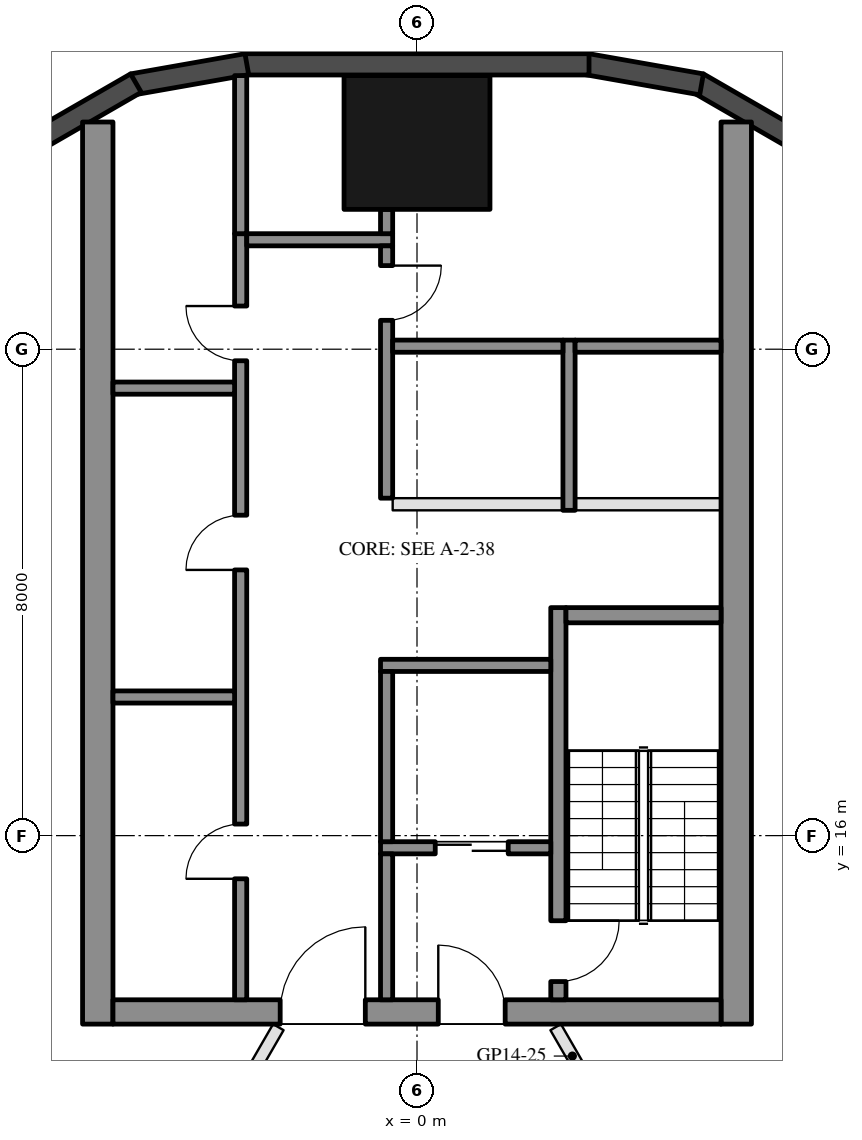
"""IFC4 building model, lengths in metres.
Left out: names, types, materials, properties, quantities, classifications, styles, units other than length and angle.
Written with IfcOpenShell. Run it as: python <this file> out.ifc"""

import sys

from ifc_helpers import new_model, si_unit, direction, frame, frame_2d, origin, origin_2d, place, context, subcontext, project, spatial, rectangle, hollow_rectangle, extrude, element, fill, save


model = new_model("IFC4")
c1 = context("Model", 3, precision=1e-05, world=origin(), true_north=direction((0.0, 1.0)))
c2 = subcontext(c1, "Body", "Model", "MODEL_VIEW")
j1 = project(units=[si_unit("LENGTHUNIT", "METRE"), si_unit("PLANEANGLEUNIT", "RADIAN")], contexts=[c1])
p1 = place(None, origin())
s1 = spatial("IfcSite", under=j1, at=p1, CompositionType="ELEMENT")
p2 = place(p1, origin())
s2 = spatial("IfcBuilding", under=s1, at=p2, CompositionType="ELEMENT")
p3 = place(p2, frame((0.0, 0.0, 165.1)))
s3 = spatial("IfcBuildingStorey", under=s2, at=p3, CompositionType="ELEMENT", Elevation=165.1)
p4 = place(p3, frame((0.0, 27.4, 0.0), z_axis=(0.0, 0.0, 1.0), x_axis=(1.0, 0.0, 0.0)))
e1 = element("IfcColumn", 1, at=p4, inside=s3, PredefinedType="COLUMN", context=c2, shape_type="SweptSolid", body=[
    extrude(hollow_rectangle(XDim=2.4, YDim=2.2, WallThickness=0.06, at=origin_2d()), origin(), (0.0, 0.0, 1.0), 3.7),
])
for number, where, z_axis, x_axis in (
    (2, (6.277, 27.422, 0.0), (0.0, 0.0, 1.0), (-0.866, 0.5, 0.0)),
    (3, (4.68, 28.356, 0.0), (0.0, 0.0, 1.0), (-0.985, 0.174, 0.0)),
):
    element("IfcWall", number, at=place(p3, frame(where, z_axis=z_axis, x_axis=x_axis)), inside=s3, PredefinedType="SOLIDWALL", context=c2, shape_type="SweptSolid", body=[
        extrude(rectangle(XDim=1.91, YDim=0.35, at=frame_2d((0.955, 0.0))), origin(), (0.0, 0.0, 1.0), 3.55),
    ])
p5 = place(p3, frame((2.829, 28.685, 0.0), z_axis=(0.0, 0.0, 1.0), x_axis=(-1.0, 0.0, 0.0)))
e4 = element("IfcWall", 4, at=p5, inside=s3, PredefinedType="SOLIDWALL", context=c2, shape_type="SweptSolid", body=[
    extrude(rectangle(XDim=5.658, YDim=0.35, at=frame_2d((2.829, 0.0))), origin(), (0.0, 0.0, 1.0), 3.55),
])
for number, where, z_axis, x_axis in (
    (5, (-2.799, 28.688, 0.0), (0.0, 0.0, 1.0), (-0.985, -0.174, 0.0)),
    (6, (-4.623, 28.377, 0.0), (0.0, 0.0, 1.0), (-0.866, -0.5, 0.0)),
):
    element("IfcWall", number, at=place(p3, frame(where, z_axis=z_axis, x_axis=x_axis)), inside=s3, PredefinedType="SOLIDWALL", context=c2, shape_type="SweptSolid", body=[
        extrude(rectangle(XDim=1.91, YDim=0.35, at=frame_2d((0.955, 0.0))), origin(), (0.0, 0.0, 1.0), 3.55),
    ])
for number, where, z_axis, x_axis in (
    (7, (5.25, 12.9, 0.0), (0.0, 0.0, 1.0), (0.0, 1.0, 0.0)),
    (8, (-5.25, 12.9, 0.0), (0.0, 0.0, 1.0), (0.0, 1.0, 0.0)),
):
    element("IfcWall", number, at=place(p3, frame(where, z_axis=z_axis, x_axis=x_axis)), inside=s3, PredefinedType="SHEAR", context=c2, shape_type="SweptSolid", body=[
        extrude(rectangle(XDim=14.837, YDim=0.5, at=frame_2d((7.418, 0.0))), origin(), (0.0, 0.0, 1.0), 3.5),
    ])
p6 = place(p3, frame((5.0, 13.1, 0.0), z_axis=(0.0, 0.0, 1.0), x_axis=(-1.0, 0.0, 0.0)))
e9 = element("IfcWall", 9, at=p6, inside=s3, PredefinedType="SHEAR", context=c2, shape_type="SweptSolid", body=[
    extrude(rectangle(XDim=10.0, YDim=0.4, at=frame_2d((5.0, 0.0))), origin(), (0.0, 0.0, 1.0), 3.5),
])
p7 = place(p6, frame((3.55, 0.0, 0.0)))
e10 = element("IfcOpeningElement", 10, at=p7, cuts=e9, PredefinedType="OPENING", context=c2, shape_type="SweptSolid", body=[
    extrude(rectangle(XDim=1.1, YDim=2.1, at=frame_2d((0.55, 1.05))), frame((0.0, 0.21, 0.0), z_axis=(0.0, -1.0, 0.0), x_axis=(1.0, 0.0, 0.0)), (0.0, 0.0, 1.0), 0.42),
])
p8 = place(p6, frame((5.85, 0.0, 0.0)))
e11 = element("IfcOpeningElement", 11, at=p8, cuts=e9, PredefinedType="OPENING", context=c2, shape_type="SweptSolid", body=[
    extrude(rectangle(XDim=1.4, YDim=2.1, at=frame_2d((0.7, 1.05))), frame((0.0, 0.21, 0.0), z_axis=(0.0, -1.0, 0.0), x_axis=(1.0, 0.0, 0.0)), (0.0, 0.0, 1.0), 0.42),
])
p9 = place(p3, frame((2.325, 13.3, 0.0), z_axis=(0.0, 0.0, 1.0), x_axis=(0.0, 1.0, 0.0)))
e12 = element("IfcWall", 12, at=p9, inside=s3, PredefinedType="SHEAR", context=c2, shape_type="SweptSolid", body=[
    extrude(rectangle(XDim=6.45, YDim=0.25, at=frame_2d((3.225, 0.0))), origin(), (0.0, 0.0, 1.0), 3.5),
])
p10 = place(p9, frame((0.3, 0.0, 0.0)))
e13 = element("IfcOpeningElement", 13, at=p10, cuts=e12, PredefinedType="OPENING", context=c2, shape_type="SweptSolid", body=[
    extrude(rectangle(XDim=1.0, YDim=2.1, at=frame_2d((0.5, 1.05))), frame((0.0, 0.135, 0.0), z_axis=(0.0, -1.0, 0.0), x_axis=(1.0, 0.0, 0.0)), (0.0, 0.0, 1.0), 0.27),
])
p11 = place(p3, frame((5.0, 19.625, 0.0), z_axis=(0.0, 0.0, 1.0), x_axis=(-1.0, 0.0, 0.0)))
e14 = element("IfcWall", 14, at=p11, inside=s3, PredefinedType="SHEAR", context=c2, shape_type="SweptSolid", body=[
    extrude(rectangle(XDim=2.55, YDim=0.25, at=frame_2d((1.275, 0.0))), origin(), (0.0, 0.0, 1.0), 3.5),
])
p12 = place(p3, frame((2.2, 18.8, 0.0), z_axis=(0.0, 0.0, 1.0), x_axis=(-1.0, 0.0, 0.0)))
e15 = element("IfcWall", 15, at=p12, inside=s3, PredefinedType="SHEAR", context=c2, shape_type="SweptSolid", body=[
    extrude(rectangle(XDim=2.8, YDim=0.2, at=frame_2d((1.4, 0.0))), origin(), (0.0, 0.0, 1.0), 3.5),
])
p13 = place(p3, frame((2.2, 15.8, 0.0), z_axis=(0.0, 0.0, 1.0), x_axis=(-1.0, 0.0, 0.0)))
e16 = element("IfcWall", 16, at=p13, inside=s3, PredefinedType="SHEAR", context=c2, shape_type="SweptSolid", body=[
    extrude(rectangle(XDim=2.8, YDim=0.2, at=frame_2d((1.4, 0.0))), origin(), (0.0, 0.0, 1.0), 3.5),
])
p14 = place(p13, frame((0.7, 0.0, 0.0)))
e17 = element("IfcOpeningElement", 17, at=p14, cuts=e16, PredefinedType="OPENING", context=c2, shape_type="SweptSolid", body=[
    extrude(rectangle(XDim=1.2, YDim=2.1, at=frame_2d((0.6, 1.05))), frame((0.0, 0.11, 0.0), z_axis=(0.0, -1.0, 0.0), x_axis=(1.0, 0.0, 0.0)), (0.0, 0.0, 1.0), 0.22),
])
p15 = place(p3, frame((-0.5, 15.9, 0.0), z_axis=(0.0, 0.0, 1.0), x_axis=(0.0, 1.0, 0.0)))
e18 = element("IfcWall", 18, at=p15, inside=s3, PredefinedType="SHEAR", context=c2, shape_type="SweptSolid", body=[
    extrude(rectangle(XDim=2.8, YDim=0.2, at=frame_2d((1.4, 0.0))), origin(), (0.0, 0.0, 1.0), 3.5),
])
p16 = place(p3, frame((-0.5, 13.3, 0.0), z_axis=(0.0, 0.0, 1.0), x_axis=(0.0, 1.0, 0.0)))
e19 = element("IfcWall", 19, at=p16, inside=s3, PredefinedType="SHEAR", context=c2, shape_type="SweptSolid", body=[
    extrude(rectangle(XDim=2.4, YDim=0.2, at=frame_2d((1.2, 0.0))), origin(), (0.0, 0.0, 1.0), 3.5),
])
p17 = place(p3, frame((-2.9, 13.3, 0.0), z_axis=(0.0, 0.0, 1.0), x_axis=(0.0, 1.0, 0.0)))
e20 = element("IfcWall", 20, at=p17, inside=s3, PredefinedType="SHEAR", context=c2, shape_type="SweptSolid", body=[
    extrude(rectangle(XDim=12.6, YDim=0.2, at=frame_2d((6.3, 0.0))), origin(), (0.0, 0.0, 1.0), 3.5),
])
p18 = place(p17, frame((1.99, 0.0, 0.0)))
e21 = element("IfcOpeningElement", 21, at=p18, cuts=e20, PredefinedType="OPENING", context=c2, shape_type="SweptSolid", body=[
    extrude(rectangle(XDim=0.9, YDim=2.1, at=frame_2d((0.45, 1.05))), frame((0.0, 0.11, 0.0), z_axis=(0.0, -1.0, 0.0), x_axis=(1.0, 0.0, 0.0)), (0.0, 0.0, 1.0), 0.22),
])
p19 = place(p17, frame((7.07, 0.0, 0.0)))
e22 = element("IfcOpeningElement", 22, at=p19, cuts=e20, PredefinedType="OPENING", context=c2, shape_type="SweptSolid", body=[
    extrude(rectangle(XDim=0.9, YDim=2.1, at=frame_2d((0.45, 1.05))), frame((0.0, 0.11, 0.0), z_axis=(0.0, -1.0, 0.0), x_axis=(1.0, 0.0, 0.0)), (0.0, 0.0, 1.0), 0.22),
])
p20 = place(p17, frame((10.51, 0.0, 0.0)))
e23 = element("IfcOpeningElement", 23, at=p20, cuts=e20, PredefinedType="OPENING", context=c2, shape_type="SweptSolid", body=[
    extrude(rectangle(XDim=0.9, YDim=2.1, at=frame_2d((0.45, 1.05))), frame((0.0, 0.11, 0.0), z_axis=(0.0, -1.0, 0.0), x_axis=(1.0, 0.0, 0.0)), (0.0, 0.0, 1.0), 0.22),
])
p21 = place(p3, frame((-0.4, 25.8, 0.0), z_axis=(0.0, 0.0, 1.0), x_axis=(-1.0, 0.0, 0.0)))
e24 = element("IfcWall", 24, at=p21, inside=s3, PredefinedType="SHEAR", context=c2, shape_type="SweptSolid", body=[
    extrude(rectangle(XDim=2.4, YDim=0.2, at=frame_2d((1.2, 0.0))), origin(), (0.0, 0.0, 1.0), 3.5),
])
p22 = place(p3, frame((-0.5, 21.55, 0.0), z_axis=(0.0, 0.0, 1.0), x_axis=(0.0, 1.0, 0.0)))
e25 = element("IfcWall", 25, at=p22, inside=s3, PredefinedType="SHEAR", context=c2, shape_type="SweptSolid", body=[
    extrude(rectangle(XDim=4.15, YDim=0.2, at=frame_2d((2.075, 0.0))), origin(), (0.0, 0.0, 1.0), 3.5),
])
p23 = place(p22, frame((2.925, 0.0, 0.0)))
e26 = element("IfcOpeningElement", 26, at=p23, cuts=e25, PredefinedType="OPENING", context=c2, shape_type="SweptSolid", body=[
    extrude(rectangle(XDim=0.9, YDim=2.1, at=frame_2d((0.45, 1.05))), frame((0.0, 0.11, 0.0), z_axis=(0.0, -1.0, 0.0), x_axis=(1.0, 0.0, 0.0)), (0.0, 0.0, 1.0), 0.22),
])
for number, where, z_axis, x_axis in (
    (27, (-3.0, 18.28, 0.0), (0.0, 0.0, 1.0), (-1.0, 0.0, 0.0)),
    (28, (-3.0, 23.36, 0.0), (0.0, 0.0, 1.0), (-1.0, 0.0, 0.0)),
):
    element("IfcWall", number, at=place(p3, frame(where, z_axis=z_axis, x_axis=x_axis)), inside=s3, PredefinedType="SHEAR", context=c2, shape_type="SweptSolid", body=[
        extrude(rectangle(XDim=2.0, YDim=0.2, at=frame_2d((1.0, 0.0))), origin(), (0.0, 0.0, 1.0), 3.5),
    ])
p24 = place(p3, frame((-0.5, 25.9, 0.0), z_axis=(0.0, 0.0, 1.0), x_axis=(0.0, 1.0, 0.0)))
e29 = element("IfcWall", 29, at=p24, inside=s3, PredefinedType="SHEAR", context=c2, shape_type="SweptSolid", body=[
    extrude(rectangle(XDim=0.4, YDim=0.2, at=frame_2d((0.2, 0.0))), origin(), (0.0, 0.0, 1.0), 3.5),
])
p25 = place(p3, frame((-2.9, 25.9, 0.0), z_axis=(0.0, 0.0, 1.0), x_axis=(0.0, 1.0, 0.0)))
e30 = element("IfcWall", 30, at=p25, inside=s3, PredefinedType="SHEAR", context=c2, shape_type="SweptSolid", body=[
    extrude(rectangle(XDim=2.6, YDim=0.2, at=frame_2d((1.3, 0.0))), origin(), (0.0, 0.0, 1.0), 3.5),
])
p26 = place(p3, frame((2.5, 21.35, 0.0), z_axis=(0.0, 0.0, 1.0), x_axis=(0.0, 1.0, 0.0)))
e31 = element("IfcWall", 31, at=p26, inside=s3, PredefinedType="SHEAR", context=c2, shape_type="SweptSolid", body=[
    extrude(rectangle(XDim=2.8, YDim=0.2, at=frame_2d((1.4, 0.0))), origin(), (0.0, 0.0, 1.0), 3.5),
])
p27 = place(p3, frame((5.0, 24.05, 0.0), z_axis=(0.0, 0.0, 1.0), x_axis=(-1.0, 0.0, 0.0)))
e32 = element("IfcWall", 32, at=p27, inside=s3, PredefinedType="SHEAR", context=c2, shape_type="SweptSolid", body=[
    extrude(rectangle(XDim=2.4, YDim=0.2, at=frame_2d((1.2, 0.0))), origin(), (0.0, 0.0, 1.0), 3.5),
])
p28 = place(p3, frame((2.4, 24.05, 0.0), z_axis=(0.0, 0.0, 1.0), x_axis=(-1.0, 0.0, 0.0)))
e33 = element("IfcWall", 33, at=p28, inside=s3, PredefinedType="SHEAR", context=c2, shape_type="SweptSolid", body=[
    extrude(rectangle(XDim=2.8, YDim=0.2, at=frame_2d((1.4, 0.0))), origin(), (0.0, 0.0, 1.0), 3.5),
])
p29 = place(p3, frame((5.0, 21.45, 0.0), z_axis=(0.0, 0.0, 1.0), x_axis=(-1.0, 0.0, 0.0)))
e34 = element("IfcWall", 34, at=p29, inside=s3, PredefinedType="PARTITIONING", context=c2, shape_type="SweptSolid", body=[
    extrude(rectangle(XDim=2.4, YDim=0.2, at=frame_2d((1.2, 0.0))), origin(), (0.0, 0.0, 1.0), 3.5),
])
p30 = place(p3, frame((2.4, 21.45, 0.0), z_axis=(0.0, 0.0, 1.0), x_axis=(-1.0, 0.0, 0.0)))
e35 = element("IfcWall", 35, at=p30, inside=s3, PredefinedType="PARTITIONING", context=c2, shape_type="SweptSolid", body=[
    extrude(rectangle(XDim=2.8, YDim=0.2, at=frame_2d((1.4, 0.0))), origin(), (0.0, 0.0, 1.0), 3.5),
])
p31 = place(p3, frame((14.722, 13.061, 0.0), z_axis=(0.0, 0.0, 1.0), x_axis=(-0.921447968583, -0.388501790465, 0.0)))
e36 = element("IfcWall", 36, at=p31, inside=s3, PredefinedType="PARTITIONING", context=c2, shape_type="SweptSolid", body=[
    extrude(rectangle(XDim=11.066, YDim=0.2, at=frame_2d((5.533, 0.0))), origin(), (0.0, 0.0, 1.0), 2.95),
])
p32 = place(p3, frame((-13.89, 12.701, 0.0), z_axis=(0.0, 0.0, 1.0), x_axis=(0.917850876745, -0.396925393566, 0.0)))
e37 = element("IfcWall", 37, at=p32, inside=s3, PredefinedType="PARTITIONING", context=c2, shape_type="SweptSolid", body=[
    extrude(rectangle(XDim=10.147, YDim=0.2, at=frame_2d((5.074, 0.0))), origin(), (0.0, 0.0, 1.0), 2.95),
])
p33 = place(p3, frame((2.281, 12.85, 0.0), z_axis=(0.0, 0.0, 1.0), x_axis=(0.500030411023, -0.86600784526, 0.0)))
e38 = element("IfcWall", 38, at=p33, inside=s3, PredefinedType="PARTITIONING", context=c2, shape_type="SweptSolid", body=[
    extrude(rectangle(XDim=4.575, YDim=0.2, at=frame_2d((2.288, 0.0))), origin(), (0.0, 0.0, 1.0), 2.95),
])
p34 = place(p33, frame((1.787, 0.0, 0.0)))
e39 = element("IfcOpeningElement", 39, at=p34, cuts=e38, PredefinedType="OPENING", context=c2, shape_type="SweptSolid", body=[
    extrude(rectangle(XDim=1.0, YDim=2.1, at=frame_2d((0.5, 1.05))), frame((0.0, 0.11, 0.0), z_axis=(0.0, -1.0, 0.0), x_axis=(1.0, 0.0, 0.0)), (0.0, 0.0, 1.0), 0.22),
])
p35 = place(p3, frame((-4.618, 8.801, 0.0), z_axis=(0.0, 0.0, 1.0), x_axis=(0.499980071345, 0.866036909293, 0.0)))
e40 = element("IfcWall", 40, at=p35, inside=s3, PredefinedType="PARTITIONING", context=c2, shape_type="SweptSolid", body=[
    extrude(rectangle(XDim=4.676, YDim=0.2, at=frame_2d((2.338, 0.0))), origin(), (0.0, 0.0, 1.0), 2.95),
])
p36 = place(p35, frame((1.838, 0.0, 0.0)))
e41 = element("IfcOpeningElement", 41, at=p36, cuts=e40, PredefinedType="OPENING", context=c2, shape_type="SweptSolid", body=[
    extrude(rectangle(XDim=1.0, YDim=2.1, at=frame_2d((0.5, 1.05))), frame((0.0, 0.11, 0.0), z_axis=(0.0, -1.0, 0.0), x_axis=(1.0, 0.0, 0.0)), (0.0, 0.0, 1.0), 0.22),
])
p37 = place(p14, origin())
e42 = element("IfcDoor", 42, at=p37, inside=s3, OperationType="DOUBLE_DOOR_SLIDING", PredefinedType="DOOR", context=c2, shape_type="SweptSolid", body=[
    extrude(rectangle(XDim=1.2, YDim=2.1, at=frame_2d((0.6, 1.05))), frame((0.0, 0.025, 0.0), z_axis=(0.0, -1.0, 0.0), x_axis=(1.0, 0.0, 0.0)), (0.0, 0.0, 1.0), 0.05),
])
fill(e17, e42)
p38 = place(p18, origin())
e43 = element("IfcDoor", 43, at=p38, inside=s3, OperationType="SINGLE_SWING_LEFT", PredefinedType="DOOR", context=c2, shape_type="SweptSolid", body=[
    extrude(rectangle(XDim=0.9, YDim=2.1, at=frame_2d((0.45, 1.05))), frame((0.0, 0.025, 0.0), z_axis=(0.0, -1.0, 0.0), x_axis=(1.0, 0.0, 0.0)), (0.0, 0.0, 1.0), 0.05),
])
fill(e21, e43)
p39 = place(p19, origin())
e44 = element("IfcDoor", 44, at=p39, inside=s3, OperationType="SINGLE_SWING_LEFT", PredefinedType="DOOR", context=c2, shape_type="SweptSolid", body=[
    extrude(rectangle(XDim=0.9, YDim=2.1, at=frame_2d((0.45, 1.05))), frame((0.0, 0.025, 0.0), z_axis=(0.0, -1.0, 0.0), x_axis=(1.0, 0.0, 0.0)), (0.0, 0.0, 1.0), 0.05),
])
fill(e22, e44)
p40 = place(p20, origin())
e45 = element("IfcDoor", 45, at=p40, inside=s3, OperationType="SINGLE_SWING_RIGHT", PredefinedType="DOOR", context=c2, shape_type="SweptSolid", body=[
    extrude(rectangle(XDim=0.9, YDim=2.1, at=frame_2d((0.45, 1.05))), frame((0.0, 0.025, 0.0), z_axis=(0.0, -1.0, 0.0), x_axis=(1.0, 0.0, 0.0)), (0.0, 0.0, 1.0), 0.05),
])
fill(e23, e45)
p41 = place(p23, frame((0.9, 0.0, 0.0), z_axis=(0.0, 0.0, 1.0), x_axis=(-1.0, 0.0, 0.0)))
e46 = element("IfcDoor", 46, at=p41, inside=s3, OperationType="SINGLE_SWING_LEFT", PredefinedType="DOOR", context=c2, shape_type="SweptSolid", body=[
    extrude(rectangle(XDim=0.9, YDim=2.1, at=frame_2d((0.45, 1.05))), frame((0.0, 0.025, 0.0), z_axis=(0.0, -1.0, 0.0), x_axis=(1.0, 0.0, 0.0)), (0.0, 0.0, 1.0), 0.05),
])
fill(e26, e46)
p42 = place(p7, frame((1.1, 0.0, 0.0), z_axis=(0.0, 0.0, 1.0), x_axis=(-1.0, 0.0, 0.0)))
e47 = element("IfcDoor", 47, at=p42, inside=s3, OperationType="SINGLE_SWING_LEFT", PredefinedType="DOOR", context=c2, shape_type="SweptSolid", body=[
    extrude(rectangle(XDim=1.1, YDim=2.1, at=frame_2d((0.55, 1.05))), frame((0.0, 0.025, 0.0), z_axis=(0.0, -1.0, 0.0), x_axis=(1.0, 0.0, 0.0)), (0.0, 0.0, 1.0), 0.05),
])
fill(e10, e47)
p43 = place(p8, frame((1.4, 0.0, 0.0), z_axis=(0.0, 0.0, 1.0), x_axis=(-1.0, 0.0, 0.0)))
e48 = element("IfcDoor", 48, at=p43, inside=s3, OperationType="DOUBLE_DOOR_SINGLE_SWING", PredefinedType="DOOR", context=c2, shape_type="SweptSolid", body=[
    extrude(rectangle(XDim=1.4, YDim=2.1, at=frame_2d((0.7, 1.05))), frame((0.0, 0.025, 0.0), z_axis=(0.0, -1.0, 0.0), x_axis=(1.0, 0.0, 0.0)), (0.0, 0.0, 1.0), 0.05),
])
fill(e11, e48)
p44 = place(p10, frame((1.0, 0.0, 0.0), z_axis=(0.0, 0.0, 1.0), x_axis=(-1.0, 0.0, 0.0)))
e49 = element("IfcDoor", 49, at=p44, inside=s3, OperationType="SINGLE_SWING_LEFT", PredefinedType="DOOR", context=c2, shape_type="SweptSolid", body=[
    extrude(rectangle(XDim=1.0, YDim=2.1, at=frame_2d((0.5, 1.05))), frame((0.0, 0.025, 0.0), z_axis=(0.0, -1.0, 0.0), x_axis=(1.0, 0.0, 0.0)), (0.0, 0.0, 1.0), 0.05),
])
fill(e13, e49)
save(model, sys.argv[1])
